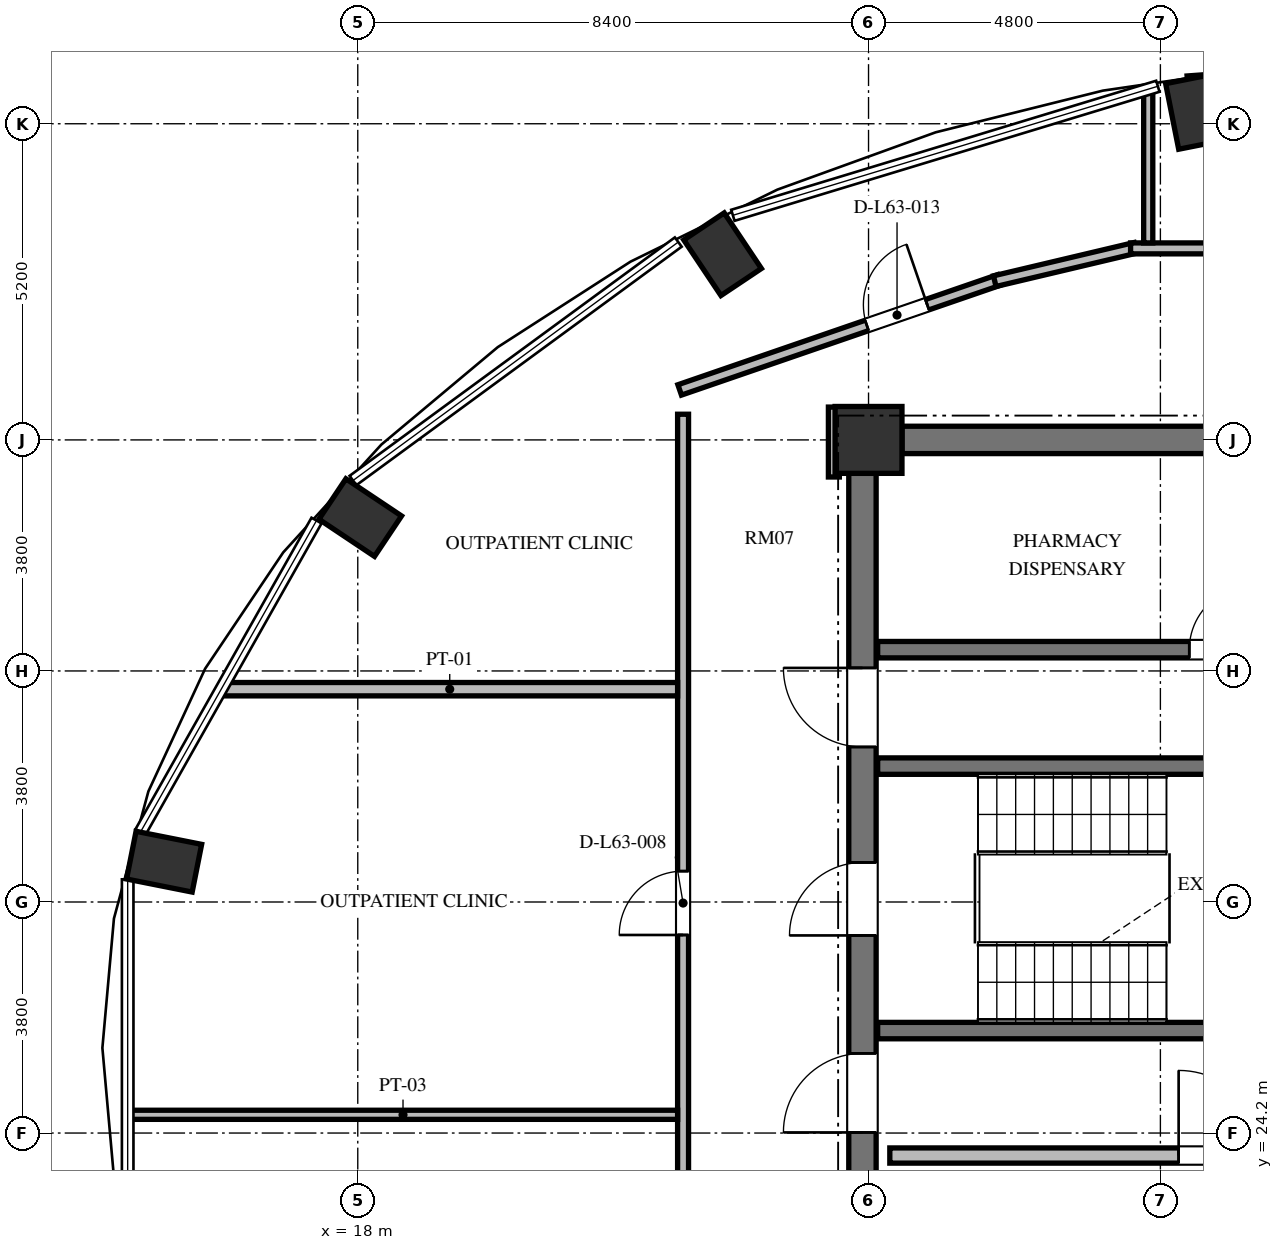
"""IFC4 building model, lengths in metres.
Left out: names, types, materials, properties, quantities, classifications, styles, units other than length and angle.
Written with IfcOpenShell. Run it as: python <this file> out.ifc"""

import sys

from ifc_helpers import new_model, si_unit, direction, frame, frame_2d, origin, origin_2d, place, context, subcontext, project, spatial, rectangle, extrude, element, fill, save


model = new_model("IFC4")
c1 = context("Model", 3, precision=1e-05, world=origin(), true_north=direction((0.0, 1.0)))
c2 = subcontext(c1, "Body", "Model", "MODEL_VIEW")
j1 = project(units=[si_unit("LENGTHUNIT", "METRE"), si_unit("PLANEANGLEUNIT", "RADIAN")], contexts=[c1])
p1 = place(None, origin())
s1 = spatial("IfcSite", under=j1, at=p1, CompositionType="ELEMENT")
p2 = place(p1, origin())
s2 = spatial("IfcBuilding", under=s1, at=p2, CompositionType="ELEMENT")
p3 = place(p2, frame((0.0, 0.0, 242.256)))
s3 = spatial("IfcBuildingStorey", under=s2, at=p3, CompositionType="ELEMENT", Elevation=242.256)
for number, where, z_axis, x_axis in (
    (1, (31.786, 40.998, 0.0), (0.0, 0.0, 1.0), (-0.195, 0.981, 0.0)),
    (2, (24.0, 38.654, 0.0), (0.0, 0.0, 1.0), (-0.556, 0.831, 0.0)),
    (3, (18.04, 34.323, 0.0), (0.0, 0.0, 1.0), (-0.831, 0.556, 0.0)),
    (4, (14.815, 28.663, 0.0), (0.0, 0.0, 1.0), (-0.981, 0.195, 0.0)),
):
    element("IfcColumn", number, at=place(p3, frame(where, z_axis=z_axis, x_axis=x_axis)), inside=s3, PredefinedType="COLUMN", context=c2, shape_type="SweptSolid", body=[
        extrude(rectangle(XDim=1.1, YDim=0.8, at=origin_2d()), origin(), (0.0, 0.0, 1.0), 3.648),
    ])
p4 = place(p3, frame((26.4, 35.6, 0.0), z_axis=(0.0, 0.0, 1.0), x_axis=(1.0, 0.0, 0.0)))
e5 = element("IfcColumn", 5, at=p4, inside=s3, PredefinedType="COLUMN", context=c2, shape_type="SweptSolid", body=[
    extrude(rectangle(XDim=1.1, YDim=1.1, at=origin_2d()), origin(), (0.0, 0.0, 1.0), 3.648),
])
p5 = place(p3, frame((26.3, 20.95, 0.0), z_axis=(0.0, 0.0, 1.0), x_axis=(0.0, 1.0, 0.0)))
e6 = element("IfcWall", 6, at=p5, inside=s3, PredefinedType="SHEAR", context=c2, shape_type="SweptSolid", body=[
    extrude(rectangle(XDim=14.1, YDim=0.45, at=frame_2d((7.05, 0.0))), origin(), (0.0, 0.0, 1.0), 3.648),
])
p6 = place(p5, frame((6.5, 0.0, 0.0)))
e7 = element("IfcOpeningElement", 7, at=p6, cuts=e6, PredefinedType="OPENING", context=c2, shape_type="SweptSolid", body=[
    extrude(rectangle(XDim=1.2, YDim=2.15, at=frame_2d((0.6, 1.075))), frame((0.0, 0.235, 0.0), z_axis=(0.0, -1.0, 0.0), x_axis=(1.0, 0.0, 0.0)), (0.0, 0.0, 1.0), 0.47),
])
p7 = place(p5, frame((9.6, 0.0, 0.0)))
e8 = element("IfcOpeningElement", 8, at=p7, cuts=e6, PredefinedType="OPENING", context=c2, shape_type="SweptSolid", body=[
    extrude(rectangle(XDim=1.3, YDim=2.2, at=frame_2d((0.65, 1.1))), frame((0.0, 0.235, 0.0), z_axis=(0.0, -1.0, 0.0), x_axis=(1.0, 0.0, 0.0)), (0.0, 0.0, 1.0), 0.47),
])
p8 = place(p5, frame((3.26, 0.0, 0.0)))
e9 = element("IfcOpeningElement", 9, at=p8, cuts=e6, PredefinedType="OPENING", context=c2, shape_type="SweptSolid", body=[
    extrude(rectangle(XDim=1.3, YDim=2.2, at=frame_2d((0.65, 1.1))), frame((0.0, 0.235, 0.0), z_axis=(0.0, -1.0, 0.0), x_axis=(1.0, 0.0, 0.0)), (0.0, 0.0, 1.0), 0.47),
])
p9 = place(p3, frame((26.95, 35.6, 0.0), z_axis=(0.0, 0.0, 1.0), x_axis=(1.0, 0.0, 0.0)))
e10 = element("IfcWall", 10, at=p9, inside=s3, PredefinedType="SHEAR", context=c2, shape_type="SweptSolid", body=[
    extrude(rectangle(XDim=5.45, YDim=0.45, at=frame_2d((2.725, 0.0))), origin(), (0.0, 0.0, 1.0), 3.648),
])
p10 = place(p3, frame((36.179, 41.753, 0.0), z_axis=(0.0, 0.0, 1.0), x_axis=(-0.997408782787, -0.071942477163, 0.0)))
e11 = element("IfcWall", 11, at=p10, inside=s3, PredefinedType="SOLIDWALL", context=c2, shape_type="SweptSolid", body=[
    extrude(rectangle(XDim=4.541, YDim=0.32, at=frame_2d((2.27, 0.0))), origin(), (0.0, 0.0, 1.0), 3.198),
])
p11 = place(p10, frame((1.67, 0.0, 0.85)))
e12 = element("IfcOpeningElement", 12, at=p11, cuts=e11, PredefinedType="OPENING", context=c2, shape_type="SweptSolid", body=[
    extrude(rectangle(XDim=1.2, YDim=1.8, at=frame_2d((0.6, 0.9))), frame((0.0, 0.17, 0.0), z_axis=(0.0, -1.0, 0.0), x_axis=(1.0, 0.0, 0.0)), (0.0, 0.0, 1.0), 0.34),
])
for number, where, z_axis, x_axis in (
    (13, (26.55, 30.235, 0.0), (0.0, 0.0, 1.0), (1.0, 0.0, 0.0)),
    (14, (26.55, 25.885, 0.0), (0.0, 0.0, 1.0), (1.0, 0.0, 0.0)),
):
    element("IfcWall", number, at=place(p3, frame(where, z_axis=z_axis, x_axis=x_axis)), inside=s3, PredefinedType="SHEAR", context=c2, shape_type="SweptSolid", body=[
        extrude(rectangle(XDim=7.985, YDim=0.27, at=frame_2d((3.992, 0.0))), origin(), (0.0, 0.0, 1.0), 3.648),
    ])
p12 = place(p3, frame((26.55, 32.15, 0.0), z_axis=(0.0, 0.0, 1.0), x_axis=(1.0, 0.0, 0.0)))
e15 = element("IfcWall", 15, at=p12, inside=s3, PredefinedType="SHEAR", context=c2, shape_type="SweptSolid", body=[
    extrude(rectangle(XDim=16.4, YDim=0.27, at=frame_2d((8.2, 0.0))), origin(), (0.0, 0.0, 1.0), 3.648),
])
p13 = place(p12, frame((5.125, 0.0, 0.0)))
e16 = element("IfcOpeningElement", 16, at=p13, cuts=e15, PredefinedType="OPENING", context=c2, shape_type="SweptSolid", body=[
    extrude(rectangle(XDim=1.05, YDim=2.15, at=frame_2d((0.525, 1.075))), frame((0.0, 0.145, 0.0), z_axis=(0.0, -1.0, 0.0), x_axis=(1.0, 0.0, 0.0)), (0.0, 0.0, 1.0), 0.29),
])
p14 = place(p12, frame((11.9, 0.0, 0.0)))
e17 = element("IfcOpeningElement", 17, at=p14, cuts=e15, PredefinedType="OPENING", context=c2, shape_type="SweptSolid", body=[
    extrude(rectangle(XDim=1.1, YDim=2.2, at=frame_2d((0.55, 1.1))), frame((0.0, 0.145, 0.0), z_axis=(0.0, -1.0, 0.0), x_axis=(1.0, 0.0, 0.0)), (0.0, 0.0, 1.0), 0.29),
])
p15 = place(p12, frame((14.5, 0.0, 0.0)))
e18 = element("IfcOpeningElement", 18, at=p15, cuts=e15, PredefinedType="OPENING", context=c2, shape_type="SweptSolid", body=[
    extrude(rectangle(XDim=1.1, YDim=2.2, at=frame_2d((0.55, 1.1))), frame((0.0, 0.145, 0.0), z_axis=(0.0, -1.0, 0.0), x_axis=(1.0, 0.0, 0.0)), (0.0, 0.0, 1.0), 0.29),
])
p16 = place(p3, frame((26.75, 23.83, 0.0), z_axis=(0.0, 0.0, 1.0), x_axis=(1.0, 0.0, 0.0)))
e19 = element("IfcWall", 19, at=p16, inside=s3, PredefinedType="SOLIDWALL", context=c2, shape_type="SweptSolid", body=[
    extrude(rectangle(XDim=16.2, YDim=0.25, at=frame_2d((8.1, 0.0))), origin(), (0.0, 0.0, 1.0), 3.198),
])
p17 = place(p16, frame((4.75, 0.0, 0.0)))
e20 = element("IfcOpeningElement", 20, at=p17, cuts=e19, PredefinedType="OPENING", context=c2, shape_type="SweptSolid", body=[
    extrude(rectangle(XDim=1.4, YDim=2.2, at=frame_2d((0.7, 1.1))), frame((0.0, 0.135, 0.0), z_axis=(0.0, -1.0, 0.0), x_axis=(1.0, 0.0, 0.0)), (0.0, 0.0, 1.0), 0.27),
])
p18 = place(p16, frame((11.7, 0.0, 0.0)))
e21 = element("IfcOpeningElement", 21, at=p18, cuts=e19, PredefinedType="OPENING", context=c2, shape_type="SweptSolid", body=[
    extrude(rectangle(XDim=1.1, YDim=2.2, at=frame_2d((0.55, 1.1))), frame((0.0, 0.135, 0.0), z_axis=(0.0, -1.0, 0.0), x_axis=(1.0, 0.0, 0.0)), (0.0, 0.0, 1.0), 0.27),
])
p19 = place(p16, frame((14.15, 0.0, 0.0)))
e22 = element("IfcOpeningElement", 22, at=p19, cuts=e19, PredefinedType="OPENING", context=c2, shape_type="SweptSolid", body=[
    extrude(rectangle(XDim=1.4, YDim=2.3, at=frame_2d((0.7, 1.15))), frame((0.0, 0.135, 0.0), z_axis=(0.0, -1.0, 0.0), x_axis=(1.0, 0.0, 0.0)), (0.0, 0.0, 1.0), 0.27),
])
p20 = place(p3, frame((23.294, 36.422, 0.0), z_axis=(0.0, 0.0, 1.0), x_axis=(0.945493277461, 0.325641616316, 0.0)))
e23 = element("IfcWall", 23, at=p20, inside=s3, PredefinedType="PARTITIONING", context=c2, shape_type="SweptSolid", body=[
    extrude(rectangle(XDim=5.562, YDim=0.18, at=frame_2d((2.781, 0.0))), origin(), (0.0, 0.0, 1.0), 2.823),
])
p21 = place(p20, frame((3.256, 0.0, 0.0)))
e24 = element("IfcOpeningElement", 24, at=p21, cuts=e23, PredefinedType="OPENING", context=c2, shape_type="SweptSolid", body=[
    extrude(rectangle(XDim=1.05, YDim=2.15, at=frame_2d((0.525, 1.075))), frame((0.0, 0.1, 0.0), z_axis=(0.0, -1.0, 0.0), x_axis=(1.0, 0.0, 0.0)), (0.0, 0.0, 1.0), 0.2),
])
p22 = place(p3, frame((28.476, 38.211, 0.0), z_axis=(0.0, 0.0, 1.0), x_axis=(0.973030562203, 0.230676234189, 0.0)))
e25 = element("IfcWall", 25, at=p22, inside=s3, PredefinedType="PARTITIONING", context=c2, shape_type="SweptSolid", body=[
    extrude(rectangle(XDim=2.377, YDim=0.18, at=frame_2d((1.188, 0.0))), origin(), (0.0, 0.0, 1.0), 3.198),
])
p23 = place(p3, frame((30.71, 38.75, 0.0), z_axis=(0.0, 0.0, 1.0), x_axis=(1.0, 0.0, 0.0)))
e26 = element("IfcWall", 26, at=p23, inside=s3, PredefinedType="PARTITIONING", context=c2, shape_type="SweptSolid", body=[
    extrude(rectangle(XDim=20.815, YDim=0.18, at=frame_2d((10.408, 0.0))), origin(), (0.0, 0.0, 1.0), 2.823),
])
p24 = place(p23, frame((11.515, 0.0, 0.0)))
e27 = element("IfcOpeningElement", 27, at=p24, cuts=e26, PredefinedType="OPENING", context=c2, shape_type="SweptSolid", body=[
    extrude(rectangle(XDim=1.05, YDim=2.15, at=frame_2d((0.525, 1.075))), frame((0.0, 0.1, 0.0), z_axis=(0.0, -1.0, 0.0), x_axis=(1.0, 0.0, 0.0)), (0.0, 0.0, 1.0), 0.2),
])
p25 = place(p23, frame((4.379, 0.0, 0.0)))
e28 = element("IfcOpeningElement", 28, at=p25, cuts=e26, PredefinedType="OPENING", context=c2, shape_type="SweptSolid", body=[
    extrude(rectangle(XDim=1.05, YDim=2.15, at=frame_2d((0.525, 1.075))), frame((0.0, 0.1, 0.0), z_axis=(0.0, -1.0, 0.0), x_axis=(1.0, 0.0, 0.0)), (0.0, 0.0, 1.0), 0.2),
])
p26 = place(p3, frame((25.83, 36.14, 0.0), z_axis=(0.0, 0.0, 1.0), x_axis=(0.0, -1.0, 0.0)))
e29 = element("IfcWall", 29, at=p26, inside=s3, PredefinedType="PARTITIONING", context=c2, shape_type="SweptSolid", body=[
    extrude(rectangle(XDim=1.15, YDim=0.18, at=frame_2d((0.575, 0.0))), origin(), (0.0, 0.0, 1.0), 3.198),
])
p27 = place(p3, frame((23.35, 19.98, 0.0), z_axis=(0.0, 0.0, 1.0), x_axis=(0.0, 1.0, 0.0)))
e30 = element("IfcWall", 30, at=p27, inside=s3, PredefinedType="PARTITIONING", context=c2, shape_type="SweptSolid", body=[
    extrude(rectangle(XDim=16.042, YDim=0.18, at=frame_2d((8.021, 0.0))), origin(), (0.0, 0.0, 1.0), 3.198),
])
p28 = place(p27, frame((7.478, 0.0, 0.0)))
e31 = element("IfcOpeningElement", 31, at=p28, cuts=e30, PredefinedType="OPENING", context=c2, shape_type="SweptSolid", body=[
    extrude(rectangle(XDim=1.05, YDim=2.15, at=frame_2d((0.525, 1.075))), frame((0.0, 0.1, 0.0), z_axis=(0.0, -1.0, 0.0), x_axis=(1.0, 0.0, 0.0)), (0.0, 0.0, 1.0), 0.2),
])
p29 = place(p27, frame((1.719, 0.0, 0.0)))
e32 = element("IfcOpeningElement", 32, at=p29, cuts=e30, PredefinedType="OPENING", context=c2, shape_type="SweptSolid", body=[
    extrude(rectangle(XDim=1.4, YDim=2.2, at=frame_2d((0.7, 1.1))), frame((0.0, 0.1, 0.0), z_axis=(0.0, -1.0, 0.0), x_axis=(1.0, 0.0, 0.0)), (0.0, 0.0, 1.0), 0.2),
])
p30 = place(p3, frame((14.228, 24.5, 0.0), z_axis=(0.0, 0.0, 1.0), x_axis=(1.0, 0.0, 0.0)))
e33 = element("IfcWall", 33, at=p30, inside=s3, PredefinedType="PARTITIONING", context=c2, shape_type="SweptSolid", body=[
    extrude(rectangle(XDim=9.032, YDim=0.15, at=frame_2d((4.516, 0.0))), origin(), (0.0, 0.0, 1.0), 3.198),
])
p31 = place(p3, frame((15.765, 31.5, 0.0), z_axis=(0.0, 0.0, 1.0), x_axis=(1.0, 0.0, 0.0)))
e34 = element("IfcWall", 34, at=p31, inside=s3, PredefinedType="PARTITIONING", context=c2, shape_type="SweptSolid", body=[
    extrude(rectangle(XDim=7.495, YDim=0.22, at=frame_2d((3.748, 0.0))), origin(), (0.0, 0.0, 1.0), 3.198),
])
p32 = place(p3, frame((31.0, 38.84, 0.0), z_axis=(0.0, 0.0, 1.0), x_axis=(0.0, 1.0, 0.0)))
e35 = element("IfcWall", 35, at=p32, inside=s3, PredefinedType="PARTITIONING", context=c2, shape_type="SweptSolid", body=[
    extrude(rectangle(XDim=2.511, YDim=0.15, at=frame_2d((1.256, 0.0))), origin(), (0.0, 0.0, 1.0), 3.198),
])
p33 = place(p6, origin())
e36 = element("IfcDoor", 36, at=p33, inside=s3, OperationType="SINGLE_SWING_LEFT", PredefinedType="DOOR", context=c2, shape_type="SweptSolid", body=[
    extrude(rectangle(XDim=1.2, YDim=2.15, at=frame_2d((0.6, 1.075))), frame((0.0, 0.025, 0.0), z_axis=(0.0, -1.0, 0.0), x_axis=(1.0, 0.0, 0.0)), (0.0, 0.0, 1.0), 0.05),
])
fill(e7, e36)
p34 = place(p7, origin())
e37 = element("IfcDoor", 37, at=p34, inside=s3, OperationType="SINGLE_SWING_RIGHT", PredefinedType="DOOR", context=c2, shape_type="SweptSolid", body=[
    extrude(rectangle(XDim=1.3, YDim=2.2, at=frame_2d((0.65, 1.1))), frame((0.0, 0.025, 0.0), z_axis=(0.0, -1.0, 0.0), x_axis=(1.0, 0.0, 0.0)), (0.0, 0.0, 1.0), 0.05),
])
fill(e8, e37)
p35 = place(p8, origin())
e38 = element("IfcDoor", 38, at=p35, inside=s3, OperationType="SINGLE_SWING_LEFT", PredefinedType="DOOR", context=c2, shape_type="SweptSolid", body=[
    extrude(rectangle(XDim=1.3, YDim=2.2, at=frame_2d((0.65, 1.1))), frame((0.0, 0.025, 0.0), z_axis=(0.0, -1.0, 0.0), x_axis=(1.0, 0.0, 0.0)), (0.0, 0.0, 1.0), 0.05),
])
fill(e9, e38)
p36 = place(p13, origin())
e39 = element("IfcDoor", 39, at=p36, inside=s3, OperationType="SINGLE_SWING_RIGHT", PredefinedType="DOOR", context=c2, shape_type="SweptSolid", body=[
    extrude(rectangle(XDim=1.05, YDim=2.15, at=frame_2d((0.525, 1.075))), frame((0.0, 0.025, 0.0), z_axis=(0.0, -1.0, 0.0), x_axis=(1.0, 0.0, 0.0)), (0.0, 0.0, 1.0), 0.05),
])
fill(e16, e39)
p37 = place(p17, origin())
e40 = element("IfcDoor", 40, at=p37, inside=s3, OperationType="SINGLE_SWING_LEFT", PredefinedType="DOOR", context=c2, shape_type="SweptSolid", body=[
    extrude(rectangle(XDim=1.4, YDim=2.2, at=frame_2d((0.7, 1.1))), frame((0.0, 0.025, 0.0), z_axis=(0.0, -1.0, 0.0), x_axis=(1.0, 0.0, 0.0)), (0.0, 0.0, 1.0), 0.05),
])
fill(e20, e40)
p38 = place(p28, origin())
e41 = element("IfcDoor", 41, at=p38, inside=s3, OperationType="SINGLE_SWING_LEFT", PredefinedType="DOOR", context=c2, shape_type="SweptSolid", body=[
    extrude(rectangle(XDim=1.05, YDim=2.15, at=frame_2d((0.525, 1.075))), frame((0.0, 0.025, 0.0), z_axis=(0.0, -1.0, 0.0), x_axis=(1.0, 0.0, 0.0)), (0.0, 0.0, 1.0), 0.05),
])
fill(e31, e41)
p39 = place(p21, origin())
e42 = element("IfcDoor", 42, at=p39, inside=s3, OperationType="SINGLE_SWING_RIGHT", PredefinedType="DOOR", context=c2, shape_type="SweptSolid", body=[
    extrude(rectangle(XDim=1.05, YDim=2.15, at=frame_2d((0.525, 1.075))), frame((0.0, 0.025, 0.0), z_axis=(0.0, -1.0, 0.0), x_axis=(1.0, 0.0, 0.0)), (0.0, 0.0, 1.0), 0.05),
])
fill(e24, e42)
save(model, sys.argv[1])
